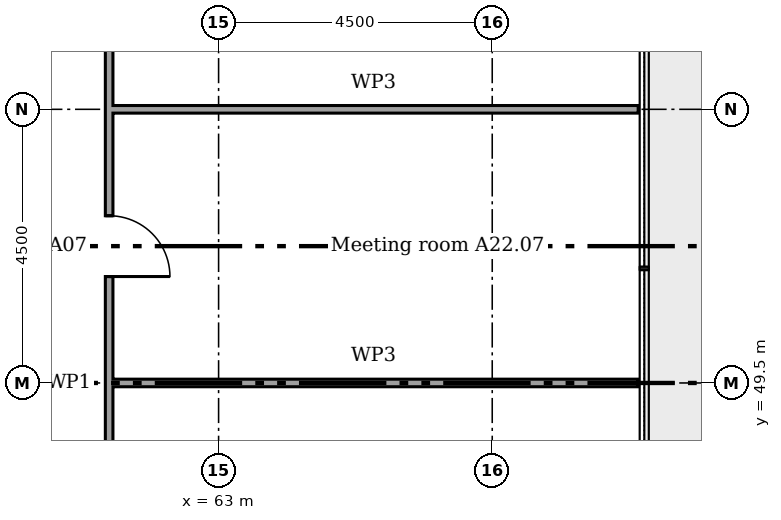
"""IFC4 building model, lengths in metres.
Left out: names, types, materials, properties, quantities, classifications, styles, units other than length and angle.
Written with IfcOpenShell. Run it as: python <this file> out.ifc"""

import sys

from ifc_helpers import new_model, si_unit, direction, frame, frame_2d, origin, place, context, subcontext, project, spatial, rectangle, extrude, element, fill, save


model = new_model("IFC4")
c1 = context("Model", 3, precision=1e-05, world=origin(), true_north=direction((0.0, 1.0)))
c2 = subcontext(c1, "Body", "Model", "MODEL_VIEW")
j1 = project(units=[si_unit("LENGTHUNIT", "METRE"), si_unit("PLANEANGLEUNIT", "RADIAN")], contexts=[c1])
p1 = place(None, origin())
s1 = spatial("IfcSite", under=j1, at=p1, CompositionType="ELEMENT")
p2 = place(p1, origin())
s2 = spatial("IfcBuilding", under=s1, at=p2, CompositionType="ELEMENT")
p3 = place(p2, frame((0.0, 0.0, 92.0)))
s3 = spatial("IfcBuildingStorey", under=s2, at=p3, CompositionType="ELEMENT", Elevation=92.0)
for number, where in (
    (1, (61.2, 49.5, 0.0)),
    (2, (61.2, 54.0, 0.0)),
):
    element("IfcWall", number, at=place(p3, frame(where)), inside=s3, PredefinedType="MOVABLE", context=c2, shape_type="SweptSolid", body=[
        extrude(rectangle(XDim=8.7, YDim=0.125, at=frame_2d((4.35, 0.0))), origin(), (0.0, 0.0, 1.0), 2.766),
    ])
p4 = place(p3, frame((61.2, 38.163, 0.0), z_axis=(0.0, 0.0, 1.0), x_axis=(0.0, 1.0, 0.0)))
e3 = element("IfcWall", 3, at=p4, inside=s3, PredefinedType="PARTITIONING", context=c2, shape_type="SweptSolid", body=[
    extrude(rectangle(XDim=22.675, YDim=0.125, at=frame_2d((11.337, 0.0))), origin(), (0.0, 0.0, 1.0), 3.45),
])
p5 = place(p4, frame((3.633, 0.0, 0.0)))
e4 = element("IfcOpeningElement", 4, at=p5, cuts=e3, PredefinedType="OPENING", context=c2, shape_type="SweptSolid", body=[
    extrude(rectangle(XDim=1.0, YDim=2.1, at=frame_2d((0.5, 1.05))), frame((0.0, 0.073, 0.0), z_axis=(0.0, -1.0, 0.0), x_axis=(1.0, 0.0, 0.0)), (0.0, 0.0, 1.0), 0.145),
])
p6 = place(p4, frame((9.042, 0.0, 0.0)))
e5 = element("IfcOpeningElement", 5, at=p6, cuts=e3, PredefinedType="OPENING", context=c2, shape_type="SweptSolid", body=[
    extrude(rectangle(XDim=1.0, YDim=2.1, at=frame_2d((0.5, 1.05))), frame((0.0, 0.073, 0.0), z_axis=(0.0, -1.0, 0.0), x_axis=(1.0, 0.0, 0.0)), (0.0, 0.0, 1.0), 0.145),
])
p7 = place(p4, frame((13.087, 0.0, 0.0)))
e6 = element("IfcOpeningElement", 6, at=p7, cuts=e3, PredefinedType="OPENING", context=c2, shape_type="SweptSolid", body=[
    extrude(rectangle(XDim=1.0, YDim=2.1, at=frame_2d((0.5, 1.05))), frame((0.0, 0.073, 0.0), z_axis=(0.0, -1.0, 0.0), x_axis=(1.0, 0.0, 0.0)), (0.0, 0.0, 1.0), 0.145),
])
p8 = place(p4, frame((17.133, 0.0, 0.0)))
e7 = element("IfcOpeningElement", 7, at=p8, cuts=e3, PredefinedType="OPENING", context=c2, shape_type="SweptSolid", body=[
    extrude(rectangle(XDim=1.0, YDim=2.1, at=frame_2d((0.5, 1.05))), frame((0.0, 0.073, 0.0), z_axis=(0.0, -1.0, 0.0), x_axis=(1.0, 0.0, 0.0)), (0.0, 0.0, 1.0), 0.145),
])
p9 = place(p7, frame((1.0, 0.0, 0.0), x_axis=(-1.0, 0.0, 0.0)))
e8 = element("IfcDoor", 8, at=p9, inside=s3, OperationType="SINGLE_SWING_LEFT", PredefinedType="DOOR", context=c2, shape_type="SweptSolid", body=[
    extrude(rectangle(XDim=1.0, YDim=2.1, at=frame_2d((0.5, 1.05))), frame((0.0, 0.025, 0.0), z_axis=(0.0, -1.0, 0.0), x_axis=(1.0, 0.0, 0.0)), (0.0, 0.0, 1.0), 0.05),
])
fill(e6, e8)
save(model, sys.argv[1])
